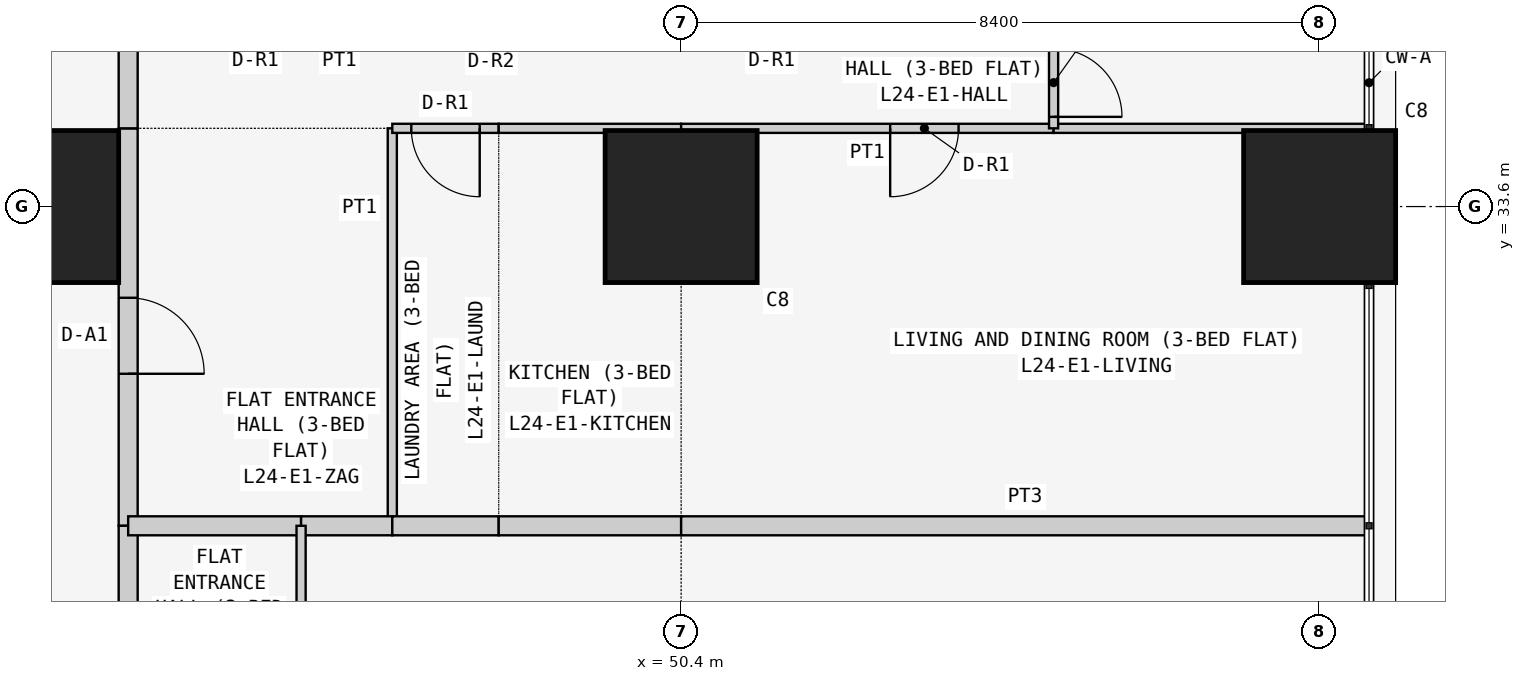
"""IFC4 building model, lengths in metres.
Left out: names, types, materials, properties, quantities, classifications, styles, units other than length and angle.
Written with IfcOpenShell. Run it as: python <this file> out.ifc"""

import sys

from ifc_helpers import new_model, si_unit, direction, frame, frame_2d, origin, origin_2d, place, context, subcontext, project, spatial, rectangle, extrude, element, fill, save


model = new_model("IFC4")
c1 = context("Model", 3, precision=1e-05, world=origin(), true_north=direction((0.0, 1.0)))
c2 = subcontext(c1, "Body", "Model", "MODEL_VIEW")
j1 = project(units=[si_unit("LENGTHUNIT", "METRE"), si_unit("PLANEANGLEUNIT", "RADIAN")], contexts=[c1])
p1 = place(None, origin())
s1 = spatial("IfcSite", under=j1, at=p1, CompositionType="ELEMENT")
p2 = place(p1, origin())
s2 = spatial("IfcBuilding", under=s1, at=p2, CompositionType="ELEMENT")
p3 = place(p2, frame((0.0, 0.0, 95.7)))
s3 = spatial("IfcBuildingStorey", under=s2, at=p3, CompositionType="ELEMENT", Elevation=95.7)
for number, where, z_axis, x_axis in (
    (1, (42.0, 33.6, 0.0), (0.0, 0.0, 1.0), (1.0, 0.0, 0.0)),
    (2, (50.4, 33.6, 0.0), (0.0, 0.0, 1.0), (1.0, 0.0, 0.0)),
    (3, (58.8, 33.6, 0.0), (0.0, 0.0, 1.0), (1.0, 0.0, 0.0)),
):
    element("IfcColumn", number, at=place(p3, frame(where, z_axis=z_axis, x_axis=x_axis)), inside=s3, PredefinedType="COLUMN", context=c2, shape_type="SweptSolid", body=[
        extrude(rectangle(XDim=2.0, YDim=2.0, at=origin_2d()), origin(), (0.0, 0.0, 1.0), 3.6),
    ])
p4 = place(p3, frame((43.125, 34.629, 0.0), z_axis=(0.0, 0.0, 1.0), x_axis=(0.0, -1.0, 0.0)))
e4 = element("IfcWall", 4, at=p4, inside=s3, PredefinedType="PARTITIONING", context=c2, shape_type="SweptSolid", body=[
    extrude(rectangle(XDim=5.229, YDim=0.25, at=frame_2d((2.615, 0.0))), origin(), (0.0, 0.0, 1.0), 3.45),
])
p5 = place(p4, frame((2.229, 0.0, 0.0)))
e5 = element("IfcOpeningElement", 5, at=p5, cuts=e4, PredefinedType="OPENING", context=c2, shape_type="SweptSolid", body=[
    extrude(rectangle(XDim=1.0, YDim=2.1, at=frame_2d((0.5, 1.05))), frame((0.0, 0.135, 0.0), z_axis=(0.0, -1.0, 0.0), x_axis=(1.0, 0.0, 0.0)), (0.0, 0.0, 1.0), 0.27),
])
p6 = place(p3, frame((43.125, 35.829, 0.0), z_axis=(0.0, 0.0, 1.0), x_axis=(0.0, -1.0, 0.0)))
e6 = element("IfcWall", 6, at=p6, inside=s3, PredefinedType="PARTITIONING", context=c2, shape_type="SweptSolid", body=[
    extrude(rectangle(XDim=1.2, YDim=0.25, at=frame_2d((0.6, 0.0))), origin(), (0.0, 0.0, 1.0), 3.45),
])
p7 = place(p3, frame((43.125, 29.4, 0.0), z_axis=(0.0, 0.0, 1.0), x_axis=(0.0, -1.0, 0.0)))
e7 = element("IfcWall", 7, at=p7, inside=s3, PredefinedType="PARTITIONING", context=c2, shape_type="SweptSolid", body=[
    extrude(rectangle(XDim=7.1, YDim=0.25, at=frame_2d((3.55, 0.0))), origin(), (0.0, 0.0, 1.0), 3.45),
])
p8 = place(p7, frame((2.05, 0.0, 0.0)))
e8 = element("IfcOpeningElement", 8, at=p8, cuts=e7, PredefinedType="OPENING", context=c2, shape_type="SweptSolid", body=[
    extrude(rectangle(XDim=1.0, YDim=2.1, at=frame_2d((0.5, 1.05))), frame((0.0, 0.135, 0.0), z_axis=(0.0, -1.0, 0.0), x_axis=(1.0, 0.0, 0.0)), (0.0, 0.0, 1.0), 0.27),
])
p9 = place(p3, frame((46.6, 29.4, 0.0), z_axis=(0.0, 0.0, 1.0), x_axis=(0.0, 1.0, 0.0)))
e9 = element("IfcWall", 9, at=p9, inside=s3, PredefinedType="PARTITIONING", context=c2, shape_type="SweptSolid", body=[
    extrude(rectangle(XDim=5.229, YDim=0.12, at=frame_2d((2.615, 0.0))), origin(), (0.0, 0.0, 1.0), 3.45),
])
p10 = place(p3, frame((43.125, 29.4, 0.0), z_axis=(0.0, 0.0, 1.0), x_axis=(1.0, 0.0, 0.0)))
e10 = element("IfcWall", 10, at=p10, inside=s3, PredefinedType="PARTITIONING", context=c2, shape_type="SweptSolid", body=[
    extrude(rectangle(XDim=2.275, YDim=0.25, at=frame_2d((1.137, 0.0))), origin(), (0.0, 0.0, 1.0), 3.45),
])
p11 = place(p3, frame((45.4, 29.4, 0.0), z_axis=(0.0, 0.0, 1.0), x_axis=(1.0, 0.0, 0.0)))
e11 = element("IfcWall", 11, at=p11, inside=s3, PredefinedType="PARTITIONING", context=c2, shape_type="SweptSolid", body=[
    extrude(rectangle(XDim=1.2, YDim=0.25, at=frame_2d((0.6, 0.0))), origin(), (0.0, 0.0, 1.0), 3.45),
])
p12 = place(p3, frame((48.0, 34.629, 0.0), z_axis=(0.0, 0.0, 1.0), x_axis=(-1.0, 0.0, 0.0)))
e12 = element("IfcWall", 12, at=p12, inside=s3, PredefinedType="PARTITIONING", context=c2, shape_type="SweptSolid", body=[
    extrude(rectangle(XDim=1.4, YDim=0.12, at=frame_2d((0.7, 0.0))), origin(), (0.0, 0.0, 1.0), 3.45),
])
p13 = place(p12, frame((0.25, 0.0, 0.0)))
e13 = element("IfcOpeningElement", 13, at=p13, cuts=e12, PredefinedType="OPENING", context=c2, shape_type="SweptSolid", body=[
    extrude(rectangle(XDim=0.9, YDim=2.1, at=frame_2d((0.45, 1.05))), frame((0.0, 0.07, 0.0), z_axis=(0.0, -1.0, 0.0), x_axis=(1.0, 0.0, 0.0)), (0.0, 0.0, 1.0), 0.14),
])
p14 = place(p3, frame((46.6, 29.4, 0.0), z_axis=(0.0, 0.0, 1.0), x_axis=(1.0, 0.0, 0.0)))
e14 = element("IfcWall", 14, at=p14, inside=s3, PredefinedType="PARTITIONING", context=c2, shape_type="SweptSolid", body=[
    extrude(rectangle(XDim=1.4, YDim=0.25, at=frame_2d((0.7, 0.0))), origin(), (0.0, 0.0, 1.0), 3.45),
])
p15 = place(p3, frame((50.4, 34.629, 0.0), z_axis=(0.0, 0.0, 1.0), x_axis=(-1.0, 0.0, 0.0)))
e15 = element("IfcWall", 15, at=p15, inside=s3, PredefinedType="PARTITIONING", context=c2, shape_type="SweptSolid", body=[
    extrude(rectangle(XDim=2.4, YDim=0.12, at=frame_2d((1.2, 0.0))), origin(), (0.0, 0.0, 1.0), 3.45),
])
p16 = place(p3, frame((48.0, 29.4, 0.0), z_axis=(0.0, 0.0, 1.0), x_axis=(1.0, 0.0, 0.0)))
e16 = element("IfcWall", 16, at=p16, inside=s3, PredefinedType="PARTITIONING", context=c2, shape_type="SweptSolid", body=[
    extrude(rectangle(XDim=2.4, YDim=0.25, at=frame_2d((1.2, 0.0))), origin(), (0.0, 0.0, 1.0), 3.45),
])
p17 = place(p3, frame((55.3, 34.629, 0.0), z_axis=(0.0, 0.0, 1.0), x_axis=(-1.0, 0.0, 0.0)))
e17 = element("IfcWall", 17, at=p17, inside=s3, PredefinedType="PARTITIONING", context=c2, shape_type="SweptSolid", body=[
    extrude(rectangle(XDim=4.9, YDim=0.12, at=frame_2d((2.45, 0.0))), origin(), (0.0, 0.0, 1.0), 3.45),
])
p18 = place(p17, frame((1.25, 0.0, 0.0)))
e18 = element("IfcOpeningElement", 18, at=p18, cuts=e17, PredefinedType="OPENING", context=c2, shape_type="SweptSolid", body=[
    extrude(rectangle(XDim=0.9, YDim=2.1, at=frame_2d((0.45, 1.05))), frame((0.0, 0.07, 0.0), z_axis=(0.0, -1.0, 0.0), x_axis=(1.0, 0.0, 0.0)), (0.0, 0.0, 1.0), 0.14),
])
p19 = place(p3, frame((59.45, 34.629, 0.0), z_axis=(0.0, 0.0, 1.0), x_axis=(-1.0, 0.0, 0.0)))
e19 = element("IfcWall", 19, at=p19, inside=s3, PredefinedType="PARTITIONING", context=c2, shape_type="SweptSolid", body=[
    extrude(rectangle(XDim=4.15, YDim=0.12, at=frame_2d((2.075, 0.0))), origin(), (0.0, 0.0, 1.0), 3.45),
])
p20 = place(p3, frame((50.4, 29.4, 0.0), z_axis=(0.0, 0.0, 1.0), x_axis=(1.0, 0.0, 0.0)))
e20 = element("IfcWall", 20, at=p20, inside=s3, PredefinedType="PARTITIONING", context=c2, shape_type="SweptSolid", body=[
    extrude(rectangle(XDim=9.05, YDim=0.25, at=frame_2d((4.525, 0.0))), origin(), (0.0, 0.0, 1.0), 3.45),
])
p21 = place(p3, frame((55.3, 34.629, 0.0), z_axis=(0.0, 0.0, 1.0), x_axis=(0.0, 1.0, 0.0)))
e21 = element("IfcWall", 21, at=p21, inside=s3, PredefinedType="PARTITIONING", context=c2, shape_type="SweptSolid", body=[
    extrude(rectangle(XDim=1.2, YDim=0.12, at=frame_2d((0.6, 0.0))), origin(), (0.0, 0.0, 1.0), 3.45),
])
p22 = place(p21, frame((0.151, 0.0, 0.0)))
e22 = element("IfcOpeningElement", 22, at=p22, cuts=e21, PredefinedType="OPENING", context=c2, shape_type="SweptSolid", body=[
    extrude(rectangle(XDim=0.9, YDim=2.1, at=frame_2d((0.45, 1.05))), frame((0.0, 0.07, 0.0), z_axis=(0.0, -1.0, 0.0), x_axis=(1.0, 0.0, 0.0)), (0.0, 0.0, 1.0), 0.14),
])
p23 = place(p3, frame((45.4, 29.4, 0.0), z_axis=(0.0, 0.0, 1.0), x_axis=(0.0, -1.0, 0.0)))
e23 = element("IfcWall", 23, at=p23, inside=s3, PredefinedType="PARTITIONING", context=c2, shape_type="SweptSolid", body=[
    extrude(rectangle(XDim=4.0, YDim=0.12, at=frame_2d((2.0, 0.0))), origin(), (0.0, 0.0, 1.0), 3.45),
])
p24 = place(p23, frame((1.05, 0.0, 0.0)))
e24 = element("IfcOpeningElement", 24, at=p24, cuts=e23, PredefinedType="OPENING", context=c2, shape_type="SweptSolid", body=[
    extrude(rectangle(XDim=0.9, YDim=2.1, at=frame_2d((0.45, 1.05))), frame((0.0, 0.07, 0.0), z_axis=(0.0, -1.0, 0.0), x_axis=(1.0, 0.0, 0.0)), (0.0, 0.0, 1.0), 0.14),
])
p25 = place(p5, origin())
e25 = element("IfcDoor", 25, at=p25, inside=s3, OperationType="SINGLE_SWING_RIGHT", PredefinedType="DOOR", context=c2, shape_type="SweptSolid", body=[
    extrude(rectangle(XDim=1.0, YDim=2.1, at=frame_2d((0.5, 1.05))), frame((0.0, 0.025, 0.0), z_axis=(0.0, -1.0, 0.0), x_axis=(1.0, 0.0, 0.0)), (0.0, 0.0, 1.0), 0.05),
])
fill(e5, e25)
p26 = place(p13, origin())
e26 = element("IfcDoor", 26, at=p26, inside=s3, OperationType="SINGLE_SWING_LEFT", PredefinedType="DOOR", context=c2, shape_type="SweptSolid", body=[
    extrude(rectangle(XDim=0.9, YDim=2.1, at=frame_2d((0.45, 1.05))), frame((0.0, 0.025, 0.0), z_axis=(0.0, -1.0, 0.0), x_axis=(1.0, 0.0, 0.0)), (0.0, 0.0, 1.0), 0.05),
])
fill(e13, e26)
p27 = place(p18, origin())
e27 = element("IfcDoor", 27, at=p27, inside=s3, OperationType="SINGLE_SWING_RIGHT", PredefinedType="DOOR", context=c2, shape_type="SweptSolid", body=[
    extrude(rectangle(XDim=0.9, YDim=2.1, at=frame_2d((0.45, 1.05))), frame((0.0, 0.025, 0.0), z_axis=(0.0, -1.0, 0.0), x_axis=(1.0, 0.0, 0.0)), (0.0, 0.0, 1.0), 0.05),
])
fill(e18, e27)
p28 = place(p22, frame((0.9, 0.0, 0.0), z_axis=(0.0, 0.0, 1.0), x_axis=(-1.0, 0.0, 0.0)))
e28 = element("IfcDoor", 28, at=p28, inside=s3, OperationType="SINGLE_SWING_RIGHT", PredefinedType="DOOR", context=c2, shape_type="SweptSolid", body=[
    extrude(rectangle(XDim=0.9, YDim=2.1, at=frame_2d((0.45, 1.05))), frame((0.0, 0.025, 0.0), z_axis=(0.0, -1.0, 0.0), x_axis=(1.0, 0.0, 0.0)), (0.0, 0.0, 1.0), 0.05),
])
fill(e22, e28)
save(model, sys.argv[1])
